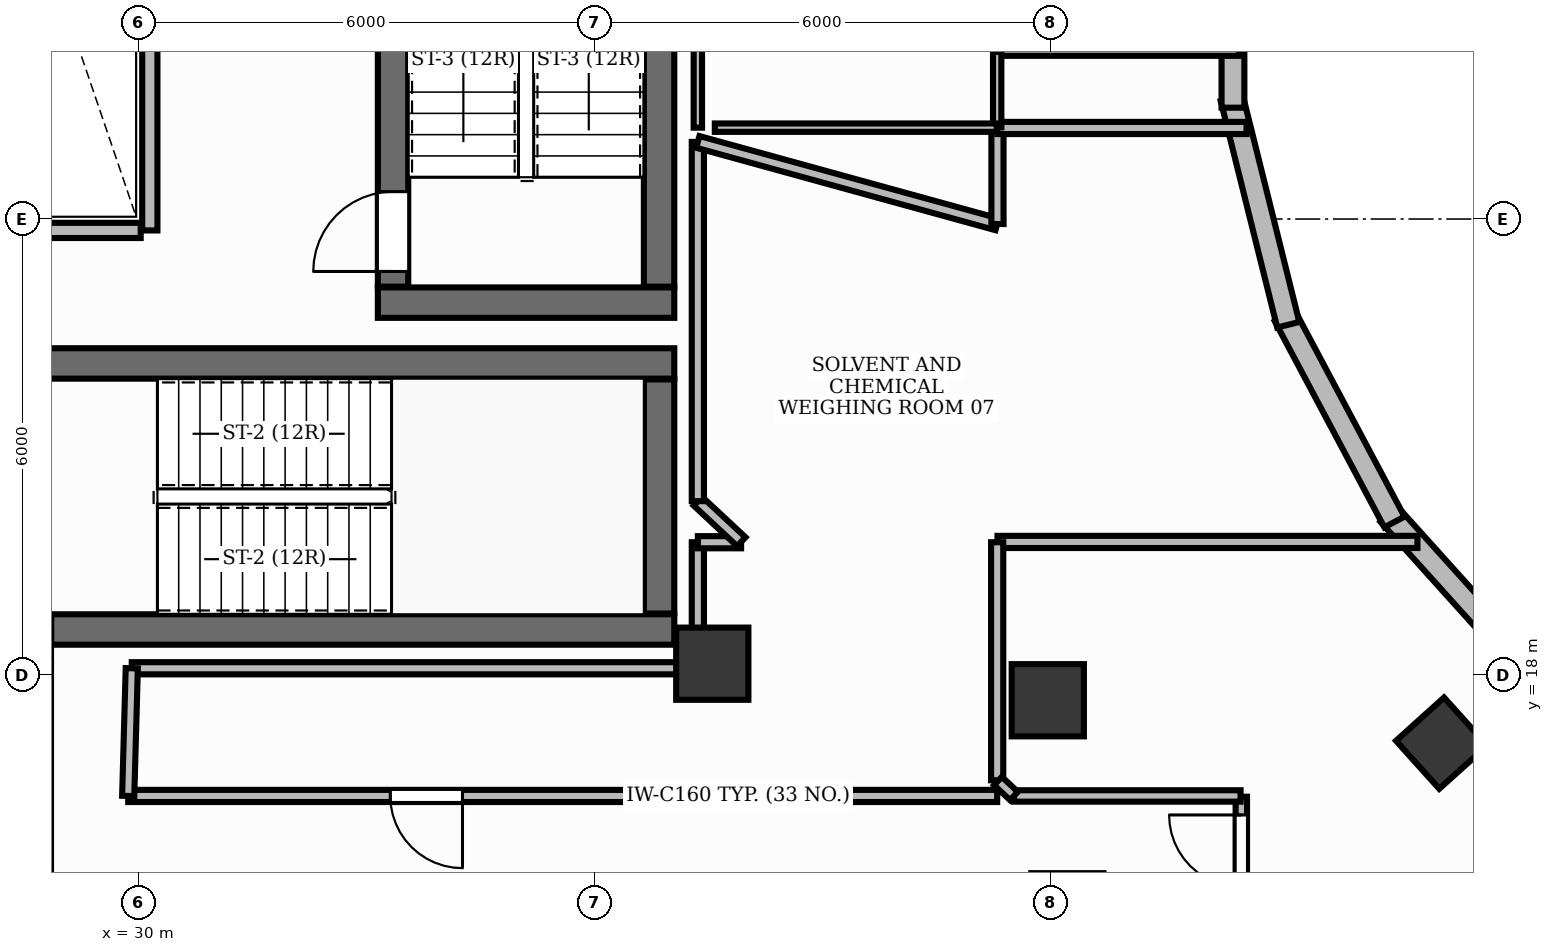
"""IFC4 building model, lengths in metres.
Left out: names, types, materials, properties, quantities, classifications, styles, units other than length and angle.
Written with IfcOpenShell. Run it as: python <this file> out.ifc"""

import sys

from ifc_helpers import new_model, si_unit, direction, frame, frame_2d, origin, origin_2d, place, context, subcontext, project, spatial, rectangle, extrude, element, fill, save


model = new_model("IFC4")
c1 = context("Model", 3, precision=1e-05, world=origin(), true_north=direction((0.0, 1.0)))
c2 = subcontext(c1, "Body", "Model", "MODEL_VIEW")
j1 = project(units=[si_unit("LENGTHUNIT", "METRE"), si_unit("PLANEANGLEUNIT", "RADIAN")], contexts=[c1])
p1 = place(None, origin())
s1 = spatial("IfcSite", under=j1, at=p1, CompositionType="ELEMENT")
p2 = place(p1, origin())
s2 = spatial("IfcBuilding", under=s1, at=p2, CompositionType="ELEMENT")
p3 = place(p2, frame((0.0, 0.0, 260.4)))
s3 = spatial("IfcBuildingStorey", under=s2, at=p3, CompositionType="ELEMENT", Elevation=260.4)
p4 = place(p3, frame((28.852, 18.6, 0.0), z_axis=(0.0, 0.0, 1.0), x_axis=(1.0, 0.0, 0.0)))
e1 = element("IfcWall", 1, at=p4, inside=s3, PredefinedType="SHEAR", context=c2, shape_type="SweptSolid", body=[
    extrude(rectangle(XDim=8.198, YDim=0.4, at=frame_2d((4.099, 0.0))), origin(), (0.0, 0.0, 1.0), 3.9),
])
p5 = place(p3, frame((28.4, 22.1, 0.0), z_axis=(0.0, 0.0, 1.0), x_axis=(1.0, 0.0, 0.0)))
e2 = element("IfcWall", 2, at=p5, inside=s3, PredefinedType="SHEAR", context=c2, shape_type="SweptSolid", body=[
    extrude(rectangle(XDim=8.65, YDim=0.4, at=frame_2d((4.325, 0.0))), origin(), (0.0, 0.0, 1.0), 3.9),
])
p6 = place(p3, frame((36.85, 18.81, 0.0), z_axis=(0.0, 0.0, 1.0), x_axis=(0.0, 1.0, 0.0)))
e3 = element("IfcWall", 3, at=p6, inside=s3, PredefinedType="SHEAR", context=c2, shape_type="SweptSolid", body=[
    extrude(rectangle(XDim=3.08, YDim=0.4, at=frame_2d((1.54, 0.0))), origin(), (0.0, 0.0, 1.0), 3.9),
])
p7 = place(p3, frame((33.15, 22.9, 0.0), z_axis=(0.0, 0.0, 1.0), x_axis=(1.0, 0.0, 0.0)))
e4 = element("IfcWall", 4, at=p7, inside=s3, PredefinedType="SHEAR", context=c2, shape_type="SweptSolid", body=[
    extrude(rectangle(XDim=3.9, YDim=0.4, at=frame_2d((1.95, 0.0))), origin(), (0.0, 0.0, 1.0), 3.9),
])
p8 = place(p3, frame((36.85, 23.11, 0.0), z_axis=(0.0, 0.0, 1.0), x_axis=(0.0, 1.0, 0.0)))
e5 = element("IfcWall", 5, at=p8, inside=s3, PredefinedType="SHEAR", context=c2, shape_type="SweptSolid", body=[
    extrude(rectangle(XDim=7.78, YDim=0.4, at=frame_2d((3.89, 0.0))), origin(), (0.0, 0.0, 1.0), 3.9),
])
p9 = place(p3, frame((33.35, 23.11, 0.0), z_axis=(0.0, 0.0, 1.0), x_axis=(0.0, 1.0, 0.0)))
e6 = element("IfcWall", 6, at=p9, inside=s3, PredefinedType="SHEAR", context=c2, shape_type="SweptSolid", body=[
    extrude(rectangle(XDim=7.78, YDim=0.4, at=frame_2d((3.89, 0.0))), origin(), (0.0, 0.0, 1.0), 3.9),
])
p10 = place(p9, frame((0.2, 0.0, 0.0)))
e7 = element("IfcOpeningElement", 7, at=p10, cuts=e6, PredefinedType="OPENING", context=c2, shape_type="SweptSolid", body=[
    extrude(rectangle(XDim=1.05, YDim=2.15, at=frame_2d((0.525, 1.075))), frame((0.0, 0.215, 0.0), z_axis=(0.0, -1.0, 0.0), x_axis=(1.0, 0.0, 0.0)), (0.0, 0.0, 1.0), 0.43),
])
p11 = place(p3, frame((37.55, 18.15, -0.0), z_axis=(0.0, 0.0, 1.0), x_axis=(1.0, 0.0, 0.0)))
e8 = element("IfcColumn", 8, at=p11, inside=s3, PredefinedType="PILASTER", context=c2, shape_type="SweptSolid", body=[
    extrude(rectangle(XDim=0.95, YDim=0.95, at=origin_2d()), origin(), (0.0, 0.0, 1.0), 3.901),
])
p12 = place(p3, frame((47.146, 17.104, -0.0), z_axis=(0.0, 0.0, 1.0), x_axis=(-0.669130606359, 0.743144825477, 0.0)))
e9 = element("IfcColumn", 9, at=p12, inside=s3, PredefinedType="COLUMN", context=c2, shape_type="SweptSolid", body=[
    extrude(rectangle(XDim=0.85, YDim=0.85, at=origin_2d()), origin(), (0.0, 0.0, 1.0), 3.901),
])
p13 = place(p3, frame((41.964, 17.669, -0.0), z_axis=(0.0, 0.0, 1.0), x_axis=(1.0, 0.0, 0.0)))
e10 = element("IfcColumn", 10, at=p13, inside=s3, PredefinedType="COLUMN", context=c2, shape_type="SweptSolid", body=[
    extrude(rectangle(XDim=0.95, YDim=0.95, at=origin_2d()), origin(), (0.0, 0.0, 1.0), 3.901),
])
p14 = place(p3, frame((48.508, 17.835, 0.0), z_axis=(0.0, 0.0, 1.0), x_axis=(-0.669127242861, 0.743147853971, 0.0)))
e11 = element("IfcWall", 11, at=p14, inside=s3, PredefinedType="STANDARD", context=c2, shape_type="SweptSolid", body=[
    extrude(rectangle(XDim=3.071, YDim=0.3, at=frame_2d((1.535, 0.0))), origin(), (0.0, 0.0, 1.0), 3.9),
])
p15 = place(p3, frame((46.524, 20.014, 0.0), z_axis=(0.0, 0.0, 1.0), x_axis=(-0.469494296004, 0.882935505017, 0.0)))
e12 = element("IfcWall", 12, at=p15, inside=s3, PredefinedType="STANDARD", context=c2, shape_type="SweptSolid", body=[
    extrude(rectangle(XDim=3.071, YDim=0.3, at=frame_2d((1.535, 0.0))), origin(), (0.0, 0.0, 1.0), 3.9),
])
p16 = place(p3, frame((45.127, 22.609, 0.0), z_axis=(0.0, 0.0, 1.0), x_axis=(-0.241880750878, 0.970305983881, 0.0)))
e13 = element("IfcWall", 13, at=p16, inside=s3, PredefinedType="STANDARD", context=c2, shape_type="SweptSolid", body=[
    extrude(rectangle(XDim=3.07, YDim=0.3, at=frame_2d((1.535, 0.0))), origin(), (0.0, 0.0, 1.0), 3.9),
])
p17 = place(p3, frame((44.4, 25.465, 0.0), z_axis=(0.0, 0.0, 1.0), x_axis=(0.0, 1.0, 0.0)))
e14 = element("IfcWall", 14, at=p17, inside=s3, PredefinedType="STANDARD", context=c2, shape_type="SweptSolid", body=[
    extrude(rectangle(XDim=3.071, YDim=0.3, at=frame_2d((1.535, 0.0))), origin(), (0.0, 0.0, 1.0), 3.9),
])
p18 = place(p3, frame((30.15, 23.85, 0.0), z_axis=(0.0, 0.0, 1.0), x_axis=(0.0, 1.0, 0.0)))
e15 = element("IfcWall", 15, at=p18, inside=s3, PredefinedType="PARTITIONING", context=c2, shape_type="SweptSolid", body=[
    extrude(rectangle(XDim=6.35, YDim=0.2, at=frame_2d((3.175, 0.0))), origin(), (0.0, 0.0, 1.0), 2.91),
])
p19 = place(p3, frame((27.934, 23.85, 0.0), z_axis=(0.0, 0.0, 1.0), x_axis=(1.0, 0.0, 0.0)))
e16 = element("IfcWall", 16, at=p19, inside=s3, PredefinedType="PARTITIONING", context=c2, shape_type="SweptSolid", body=[
    extrude(rectangle(XDim=2.096, YDim=0.2, at=frame_2d((1.048, 0.0))), origin(), (0.0, 0.0, 1.0), 2.91),
])
p20 = place(p3, frame((41.298, 16.41, 0.0), z_axis=(0.0, 0.0, 1.0), x_axis=(-1.0, 0.0, 0.0)))
e17 = element("IfcWall", 17, at=p20, inside=s3, PredefinedType="PARTITIONING", context=c2, shape_type="SweptSolid", body=[
    extrude(rectangle(XDim=11.432, YDim=0.16, at=frame_2d((5.716, 0.0))), origin(), (0.0, 0.0, 1.0), 2.91),
])
p21 = place(p20, frame((7.034, 0.0, 0.0)))
e18 = element("IfcOpeningElement", 18, at=p21, cuts=e17, PredefinedType="OPENING", context=c2, shape_type="SweptSolid", body=[
    extrude(rectangle(XDim=0.95, YDim=2.15, at=frame_2d((0.475, 1.075))), frame((0.0, 0.095, 0.0), z_axis=(0.0, -1.0, 0.0), x_axis=(1.0, 0.0, 0.0)), (0.0, 0.0, 1.0), 0.19),
])
p22 = place(p3, frame((44.51, 13.625, 0.0), z_axis=(0.0, 0.0, 1.0), x_axis=(0.0, 1.0, 0.0)))
e19 = element("IfcWall", 19, at=p22, inside=s3, PredefinedType="PARTITIONING", context=c2, shape_type="SweptSolid", body=[
    extrude(rectangle(XDim=2.775, YDim=0.15, at=frame_2d((1.387, 0.0))), origin(), (0.0, 0.0, 1.0), 2.91),
])
p23 = place(p22, frame((1.585, 0.0, 0.0)))
e20 = element("IfcOpeningElement", 20, at=p23, cuts=e19, PredefinedType="OPENING", context=c2, shape_type="SweptSolid", body=[
    extrude(rectangle(XDim=0.95, YDim=2.15, at=frame_2d((0.475, 1.075))), frame((0.0, 0.09, 0.0), z_axis=(0.0, -1.0, 0.0), x_axis=(1.0, 0.0, 0.0)), (0.0, 0.0, 1.0), 0.18),
])
p24 = place(p3, frame((29.913, 18.09, 0.0), z_axis=(0.0, 0.0, 1.0), x_axis=(1.0, 0.0, 0.0)))
e21 = element("IfcWall", 21, at=p24, inside=s3, PredefinedType="PARTITIONING", context=c2, shape_type="SweptSolid", body=[
    extrude(rectangle(XDim=7.438, YDim=0.16, at=frame_2d((3.719, 0.0))), origin(), (0.0, 0.0, 1.0), 2.91),
])
p25 = place(p3, frame((37.36, 18.1, 0.0), z_axis=(0.0, 0.0, 1.0), x_axis=(0.0, 1.0, 0.0)))
e22 = element("IfcWall", 22, at=p25, inside=s3, PredefinedType="PARTITIONING", context=c2, shape_type="SweptSolid", body=[
    extrude(rectangle(XDim=1.648, YDim=0.16, at=frame_2d((0.824, 0.0))), origin(), (0.0, 0.0, 1.0), 2.91),
])
p26 = place(p3, frame((37.36, 19.748, 0.0), z_axis=(0.0, 0.0, 1.0), x_axis=(1.0, 0.0, 0.0)))
e23 = element("IfcWall", 23, at=p26, inside=s3, PredefinedType="PARTITIONING", context=c2, shape_type="SweptSolid", body=[
    extrude(rectangle(XDim=0.569, YDim=0.16, at=frame_2d((0.285, 0.0))), origin(), (0.0, 0.0, 1.0), 2.91),
])
p27 = place(p3, frame((37.932, 19.755, 0.0), z_axis=(0.0, 0.0, 1.0), x_axis=(-0.731345965406, 0.682006656041, 0.0)))
e24 = element("IfcWall", 24, at=p27, inside=s3, PredefinedType="PARTITIONING", context=c2, shape_type="SweptSolid", body=[
    extrude(rectangle(XDim=0.782, YDim=0.16, at=frame_2d((0.391, 0.0))), origin(), (0.0, 0.0, 1.0), 2.91),
])
p28 = place(p3, frame((37.36, 20.288, 0.0), z_axis=(0.0, 0.0, 1.0), x_axis=(0.0, 1.0, 0.0)))
e25 = element("IfcWall", 25, at=p28, inside=s3, PredefinedType="PARTITIONING", context=c2, shape_type="SweptSolid", body=[
    extrude(rectangle(XDim=4.727, YDim=0.16, at=frame_2d((2.363, 0.0))), origin(), (0.0, 0.0, 1.0), 2.91),
])
p29 = place(p3, frame((37.36, 25.015, 0.0), z_axis=(0.0, 0.0, 1.0), x_axis=(0.964088745179, -0.26558029185, 0.0)))
e26 = element("IfcWall", 26, at=p29, inside=s3, PredefinedType="PARTITIONING", context=c2, shape_type="SweptSolid", body=[
    extrude(rectangle(XDim=4.083, YDim=0.16, at=frame_2d((2.042, 0.0))), origin(), (0.0, 0.0, 1.0), 2.91),
])
p30 = place(p3, frame((41.302, 23.934, 0.0), z_axis=(0.0, 0.0, 1.0), x_axis=(0.0, 1.0, 0.0)))
e27 = element("IfcWall", 27, at=p30, inside=s3, PredefinedType="PARTITIONING", context=c2, shape_type="SweptSolid", body=[
    extrude(rectangle(XDim=1.264, YDim=0.16, at=frame_2d((0.632, 0.0))), origin(), (0.0, 0.0, 1.0), 2.91),
])
p31 = place(p3, frame((41.302, 25.198, 0.0), z_axis=(0.0, 0.0, 1.0), x_axis=(1.0, 0.0, 0.0)))
e28 = element("IfcWall", 28, at=p31, inside=s3, PredefinedType="PARTITIONING", context=c2, shape_type="SweptSolid", body=[
    extrude(rectangle(XDim=3.277, YDim=0.16, at=frame_2d((1.638, 0.0))), origin(), (0.0, 0.0, 1.0), 2.91),
])
p32 = place(p3, frame((46.827, 19.752, 0.0), z_axis=(0.0, 0.0, 1.0), x_axis=(-1.0, 0.0, 0.0)))
e29 = element("IfcWall", 29, at=p32, inside=s3, PredefinedType="PARTITIONING", context=c2, shape_type="SweptSolid", body=[
    extrude(rectangle(XDim=5.525, YDim=0.16, at=frame_2d((2.762, 0.0))), origin(), (0.0, 0.0, 1.0), 2.91),
])
p33 = place(p3, frame((41.298, 19.748, 0.0), z_axis=(0.0, 0.0, 1.0), x_axis=(0.0, -1.0, 0.0)))
e30 = element("IfcWall", 30, at=p33, inside=s3, PredefinedType="PARTITIONING", context=c2, shape_type="SweptSolid", body=[
    extrude(rectangle(XDim=3.132, YDim=0.16, at=frame_2d((1.566, 0.0))), origin(), (0.0, 0.0, 1.0), 2.91),
])
p34 = place(p3, frame((29.866, 16.41, 0.0), z_axis=(0.0, 0.0, 1.0), x_axis=(0.027888015446, 0.999611053658, 0.0)))
e31 = element("IfcWall", 31, at=p34, inside=s3, PredefinedType="PARTITIONING", context=c2, shape_type="SweptSolid", body=[
    extrude(rectangle(XDim=1.681, YDim=0.16, at=frame_2d((0.84, 0.0))), origin(), (0.0, 0.0, 1.0), 2.91),
])
p35 = place(p3, frame((44.5, 16.41, 0.0), z_axis=(0.0, 0.0, 1.0), x_axis=(-1.0, 0.0, 0.0)))
e32 = element("IfcWall", 32, at=p35, inside=s3, PredefinedType="PARTITIONING", context=c2, shape_type="SweptSolid", body=[
    extrude(rectangle(XDim=2.981, YDim=0.15, at=frame_2d((1.491, 0.0))), origin(), (0.0, 0.0, 1.0), 2.91),
])
p36 = place(p3, frame((41.519, 16.41, 0.0), z_axis=(0.0, 0.0, 1.0), x_axis=(-0.730829938628, 0.682559595057, 0.0)))
e33 = element("IfcWall", 33, at=p36, inside=s3, PredefinedType="PARTITIONING", context=c2, shape_type="SweptSolid", body=[
    extrude(rectangle(XDim=0.288, YDim=0.15, at=frame_2d((0.144, 0.0))), origin(), (0.0, 0.0, 1.0), 2.91),
])
p37 = place(p3, frame((44.479, 26.202, 0.0), z_axis=(0.0, 0.0, 1.0), x_axis=(-1.0, 0.0, 0.0)))
e34 = element("IfcWall", 34, at=p37, inside=s3, PredefinedType="MOVABLE", context=c2, shape_type="SweptSolid", body=[
    extrude(rectangle(XDim=3.177, YDim=0.11, at=frame_2d((1.588, 0.0))), origin(), (0.0, 0.0, 1.0), 2.91),
])
p38 = place(p3, frame((41.298, 26.198, 0.0), z_axis=(0.0, 0.0, 1.0), x_axis=(0.0, -1.0, 0.0)))
e35 = element("IfcWall", 35, at=p38, inside=s3, PredefinedType="MOVABLE", context=c2, shape_type="SweptSolid", body=[
    extrude(rectangle(XDim=0.991, YDim=0.11, at=frame_2d((0.495, 0.0))), origin(), (0.0, 0.0, 1.0), 2.91),
])
p39 = place(p3, frame((41.293, 25.202, 0.0), z_axis=(0.0, 0.0, 1.0), x_axis=(-1.0, 0.0, 0.0)))
e36 = element("IfcWall", 36, at=p39, inside=s3, PredefinedType="MOVABLE", context=c2, shape_type="SweptSolid", body=[
    extrude(rectangle(XDim=3.709, YDim=0.11, at=frame_2d((1.855, 0.0))), origin(), (0.0, 0.0, 1.0), 2.91),
])
p40 = place(p3, frame((37.36, 25.202, 0.0), z_axis=(0.0, 0.0, 1.0), x_axis=(0.0, 1.0, 0.0)))
e37 = element("IfcWall", 37, at=p40, inside=s3, PredefinedType="MOVABLE", context=c2, shape_type="SweptSolid", body=[
    extrude(rectangle(XDim=4.205, YDim=0.11, at=frame_2d((2.103, 0.0))), origin(), (0.0, 0.0, 1.0), 2.91),
])
p41 = place(p10, origin())
e38 = element("IfcDoor", 38, at=p41, inside=s3, OperationType="SINGLE_SWING_LEFT", PredefinedType="DOOR", context=c2, shape_type="SweptSolid", body=[
    extrude(rectangle(XDim=1.05, YDim=2.15, at=frame_2d((0.525, 1.075))), frame((0.0, 0.025, 0.0), z_axis=(0.0, -1.0, 0.0), x_axis=(1.0, 0.0, 0.0)), (0.0, 0.0, 1.0), 0.05),
])
fill(e7, e38)
p42 = place(p21, origin())
e39 = element("IfcDoor", 39, at=p42, inside=s3, OperationType="SINGLE_SWING_LEFT", PredefinedType="DOOR", context=c2, shape_type="SweptSolid", body=[
    extrude(rectangle(XDim=0.95, YDim=2.15, at=frame_2d((0.475, 1.075))), frame((0.0, 0.025, 0.0), z_axis=(0.0, -1.0, 0.0), x_axis=(1.0, 0.0, 0.0)), (0.0, 0.0, 1.0), 0.05),
])
fill(e18, e39)
p43 = place(p23, origin())
e40 = element("IfcDoor", 40, at=p43, inside=s3, OperationType="SINGLE_SWING_RIGHT", PredefinedType="DOOR", context=c2, shape_type="SweptSolid", body=[
    extrude(rectangle(XDim=0.95, YDim=2.15, at=frame_2d((0.475, 1.075))), frame((0.0, 0.025, 0.0), z_axis=(0.0, -1.0, 0.0), x_axis=(1.0, 0.0, 0.0)), (0.0, 0.0, 1.0), 0.05),
])
fill(e20, e40)
save(model, sys.argv[1])
